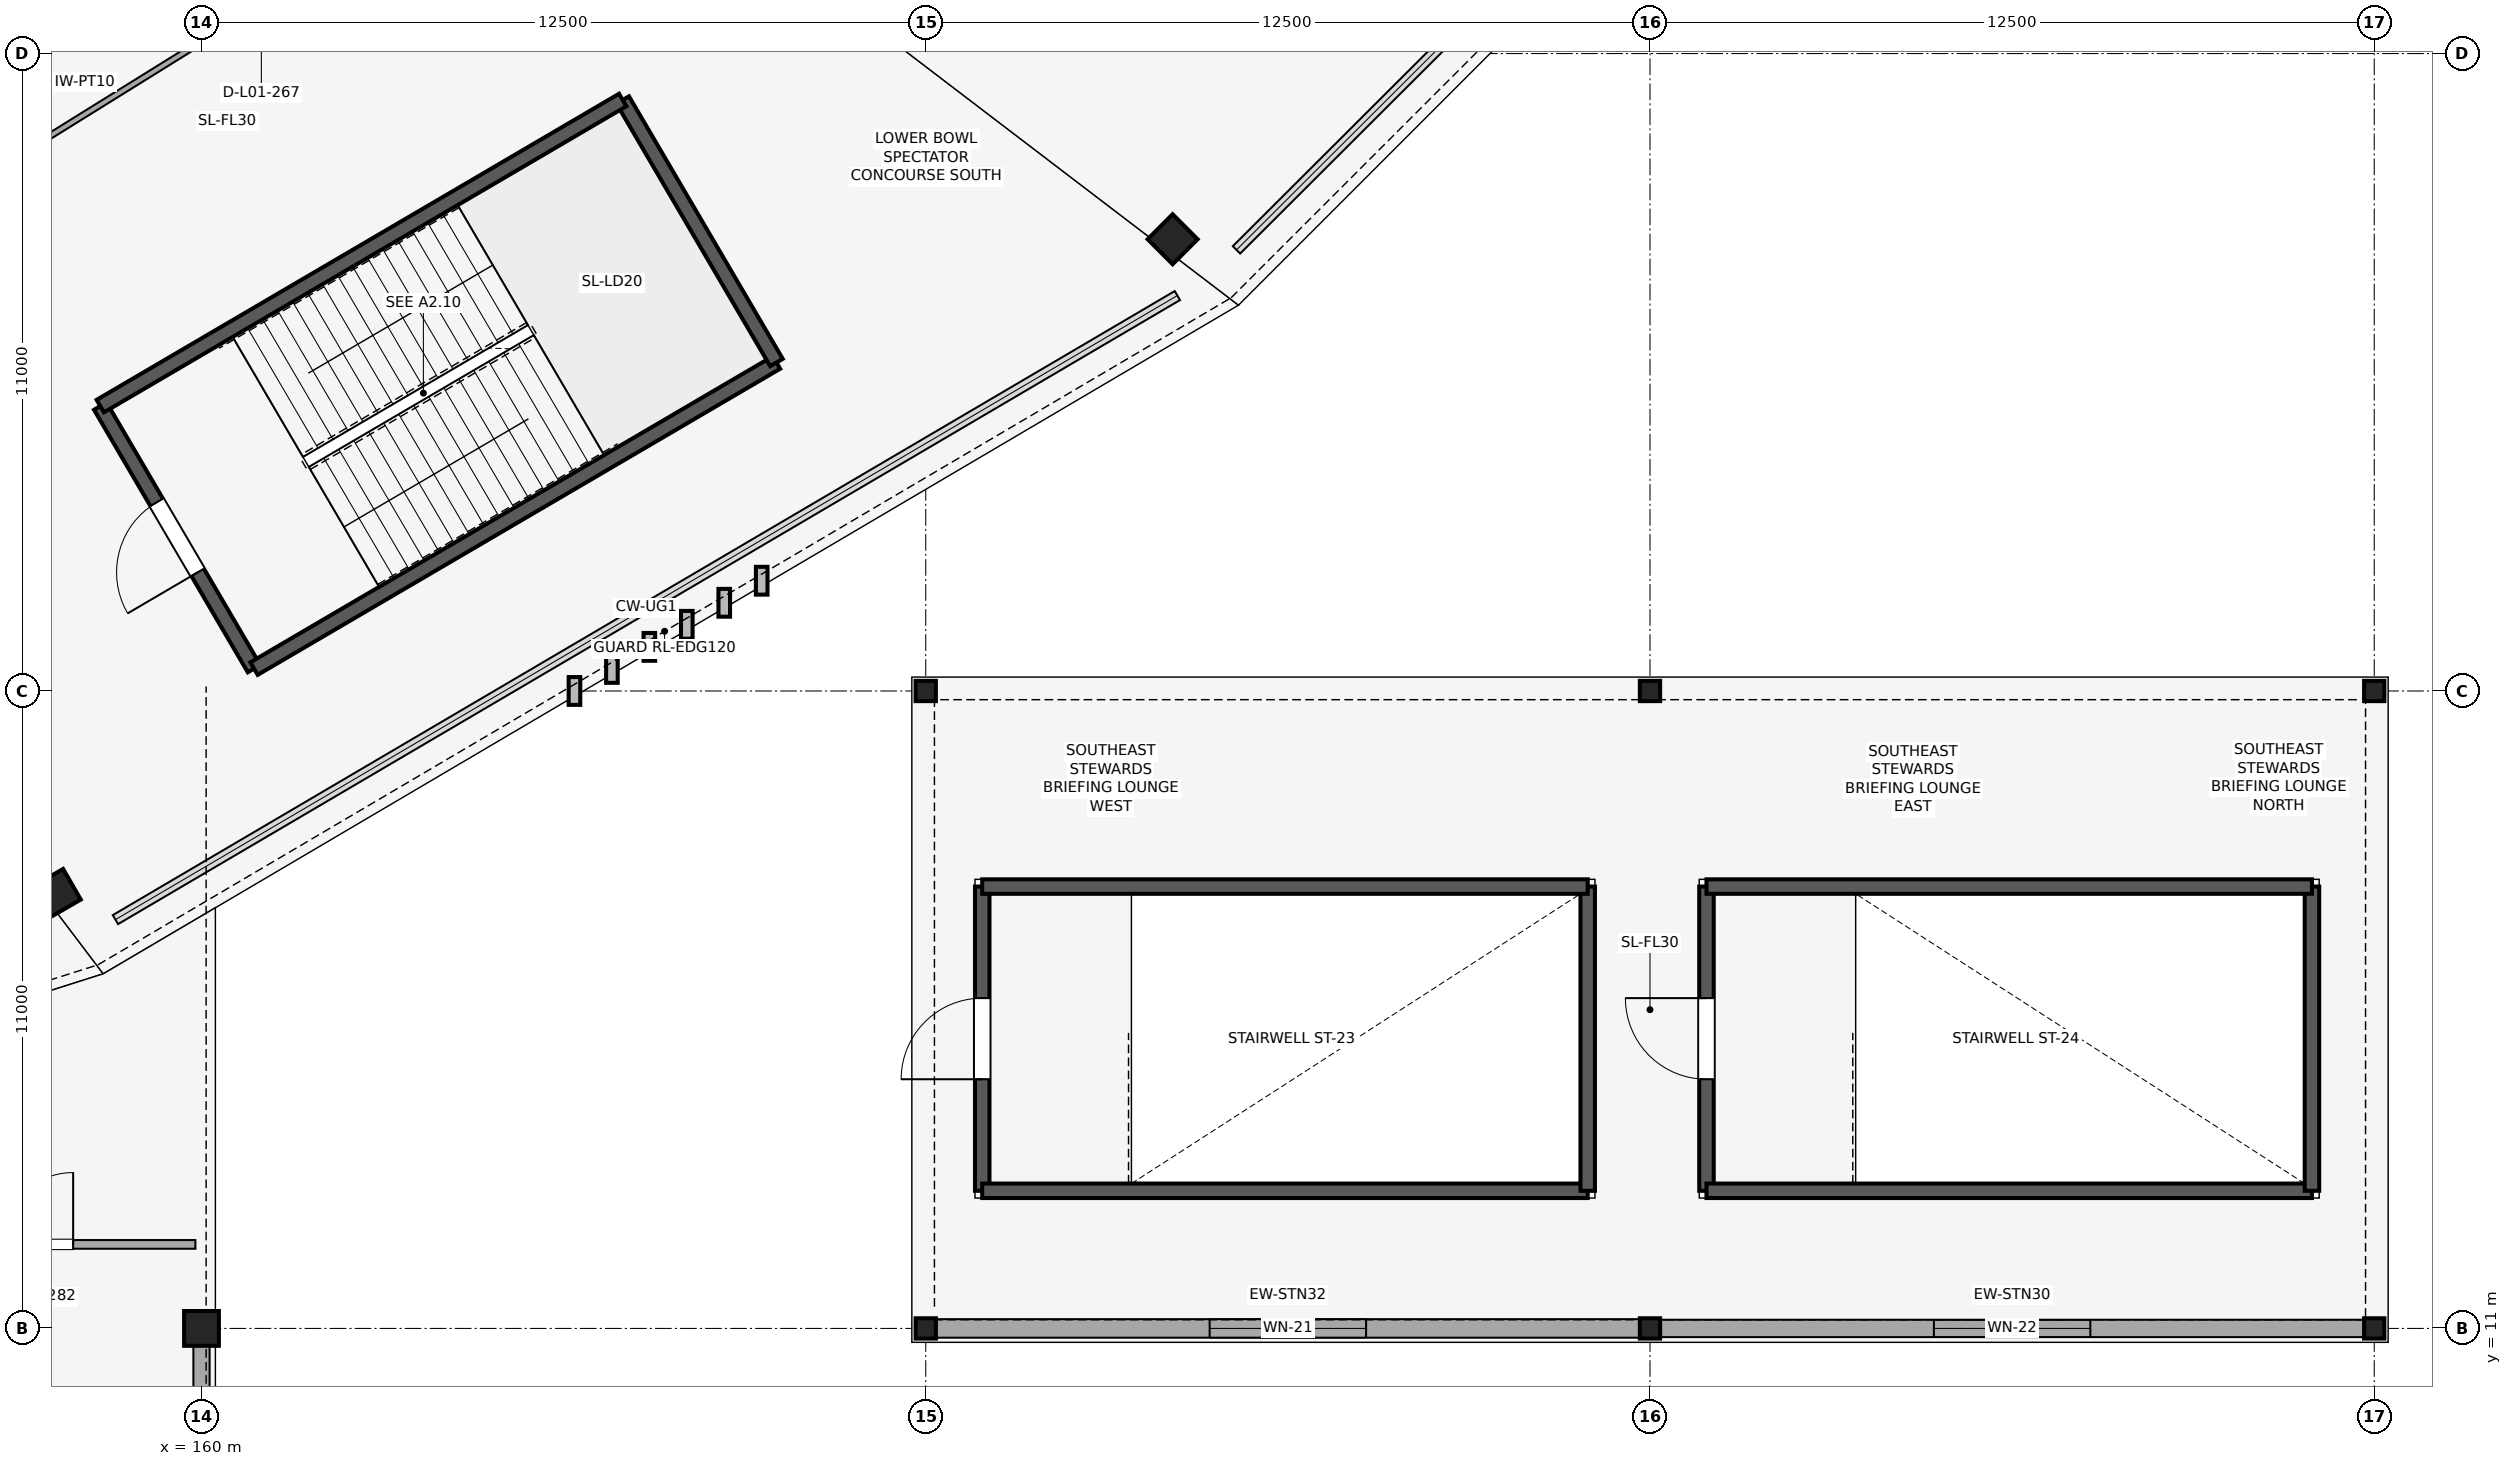
"""IFC4 building model, lengths in metres.
Left out: names, types, materials, properties, quantities, classifications, styles, units other than length and angle.
Written with IfcOpenShell. Run it as: python <this file> out.ifc"""

import sys

from ifc_helpers import new_model, si_unit, direction, frame, frame_2d, origin, origin_2d, place, context, subcontext, project, spatial, rectangle, hollow_rectangle, hollow_circle, extrude, element, fill, save


model = new_model("IFC4")
c1 = context("Model", 3, precision=1e-05, world=origin(), true_north=direction((0.0, 1.0)))
c2 = subcontext(c1, "Body", "Model", "MODEL_VIEW")
j1 = project(units=[si_unit("LENGTHUNIT", "METRE"), si_unit("PLANEANGLEUNIT", "RADIAN")], contexts=[c1])
p1 = place(None, origin())
s1 = spatial("IfcSite", under=j1, at=p1, CompositionType="ELEMENT")
p2 = place(p1, origin())
s2 = spatial("IfcBuilding", under=s1, at=p2, CompositionType="ELEMENT")
p3 = place(p2, frame((0.0, 0.0, 5.4)))
s3 = spatial("IfcBuildingStorey", under=s2, at=p3, CompositionType="ELEMENT", Elevation=5.4)
for number, where, z_axis, x_axis in (
    (1, (157.5, 18.512, 0.0), (0.0, 0.0, 1.0), (0.5, -0.866, 0.0)),
    (2, (176.761, 29.795, 0.0), (0.0, 0.0, 1.0), (0.707, -0.707, 0.0)),
):
    element("IfcColumn", number, at=place(p3, frame(where, z_axis=z_axis, x_axis=x_axis)), inside=s3, PredefinedType="COLUMN", context=c2, shape_type="SweptSolid", body=[
        extrude(hollow_circle(Radius=0.305, WallThickness=0.03, at=origin_2d()), origin(), (0.0, 0.0, 1.0), 5.2),
    ])
p4 = place(p3, frame((160.0, 11.0, 0.0), z_axis=(0.0, 0.0, 1.0), x_axis=(1.0, 0.0, 0.0)))
e3 = element("IfcColumn", 3, at=p4, inside=s3, PredefinedType="COLUMN", context=c2, shape_type="SweptSolid", body=[
    extrude(rectangle(XDim=0.6, YDim=0.6, at=origin_2d()), origin(), (0.0, 0.0, 1.0), 5.2),
])
for number, where, z_axis, x_axis in (
    (4, (172.5, 11.0, 0.0), (0.0, 0.0, 1.0), (1.0, 0.0, 0.0)),
    (5, (172.5, 22.0, 0.0), (0.0, 0.0, 1.0), (1.0, 0.0, 0.0)),
    (6, (185.0, 11.0, 0.0), (0.0, 0.0, 1.0), (1.0, 0.0, 0.0)),
    (7, (185.0, 22.0, 0.0), (0.0, 0.0, 1.0), (1.0, 0.0, 0.0)),
    (8, (197.5, 11.0, 0.0), (0.0, 0.0, 1.0), (1.0, 0.0, 0.0)),
    (9, (197.5, 22.0, 0.0), (0.0, 0.0, 1.0), (1.0, 0.0, 0.0)),
):
    element("IfcColumn", number, at=place(p3, frame(where, z_axis=z_axis, x_axis=x_axis)), inside=s3, PredefinedType="COLUMN", context=c2, shape_type="SweptSolid", body=[
        extrude(hollow_rectangle(XDim=0.35, YDim=0.35, WallThickness=0.02, at=origin_2d()), origin(), (0.0, 0.0, 1.0), 5.2),
    ])
p5 = place(p3, frame((160.0, 0.222, 0.0), z_axis=(0.0, 0.0, 1.0), x_axis=(0.0, 1.0, 0.0)))
e10 = element("IfcWall", 10, at=p5, inside=s3, PredefinedType="STANDARD", context=c2, shape_type="SweptSolid", body=[
    extrude(rectangle(XDim=10.481, YDim=0.28, at=frame_2d((5.24, 0.0))), origin(), (0.0, 0.0, 1.0), 4.3),
])
p6 = place(p5, frame((4.64, 0.0, 0.95)))
e11 = element("IfcOpeningElement", 11, at=p6, cuts=e10, PredefinedType="OPENING", context=c2, shape_type="SweptSolid", body=[
    extrude(rectangle(XDim=1.2, YDim=1.35, at=frame_2d((0.6, 0.675))), frame((0.0, 0.15, 0.0), z_axis=(0.0, -1.0, 0.0), x_axis=(1.0, 0.0, 0.0)), (0.0, 0.0, 1.0), 0.3),
])
p7 = place(p3, frame((172.672, 11.0, 0.0), z_axis=(0.0, 0.0, 1.0), x_axis=(1.0, 0.0, 0.0)))
e12 = element("IfcWall", 12, at=p7, inside=s3, PredefinedType="STANDARD", context=c2, shape_type="SweptSolid", body=[
    extrude(rectangle(XDim=12.156, YDim=0.32, at=frame_2d((6.078, 0.0))), origin(), (0.0, 0.0, 1.0), 4.3),
])
p8 = place(p7, frame((4.728, 0.0, 0.95)))
e13 = element("IfcOpeningElement", 13, at=p8, cuts=e12, PredefinedType="OPENING", context=c2, shape_type="SweptSolid", body=[
    extrude(rectangle(XDim=2.7, YDim=1.35, at=frame_2d((1.35, 0.675))), frame((0.0, 0.17, 0.0), z_axis=(0.0, -1.0, 0.0), x_axis=(1.0, 0.0, 0.0)), (0.0, 0.0, 1.0), 0.34),
])
p9 = place(p3, frame((185.172, 11.0, 0.0), z_axis=(0.0, 0.0, 1.0), x_axis=(1.0, 0.0, 0.0)))
e14 = element("IfcWall", 14, at=p9, inside=s3, PredefinedType="STANDARD", context=c2, shape_type="SweptSolid", body=[
    extrude(rectangle(XDim=12.156, YDim=0.3, at=frame_2d((6.078, 0.0))), origin(), (0.0, 0.0, 1.0), 4.3),
])
p10 = place(p9, frame((4.728, 0.0, 0.95)))
e15 = element("IfcOpeningElement", 15, at=p10, cuts=e14, PredefinedType="OPENING", context=c2, shape_type="SweptSolid", body=[
    extrude(rectangle(XDim=2.7, YDim=1.6, at=frame_2d((1.35, 0.8))), frame((0.0, 0.16, 0.0), z_axis=(0.0, -1.0, 0.0), x_axis=(1.0, 0.0, 0.0)), (0.0, 0.0, 1.0), 0.32),
])
p11 = place(p3, frame((158.253, 26.916, 0.0), z_axis=(0.0, 0.0, 1.0), x_axis=(0.505460490551, -0.862849750821, 0.0)))
e16 = element("IfcWall", 16, at=p11, inside=s3, PredefinedType="SHEAR", context=c2, shape_type="SweptSolid", body=[
    extrude(rectangle(XDim=5.25, YDim=0.25, at=frame_2d((2.625, 0.0))), origin(), (0.0, 0.0, 1.0), 4.92),
])
p12 = place(p11, frame((1.925, 0.0, 0.0)))
e17 = element("IfcOpeningElement", 17, at=p12, cuts=e16, PredefinedType="OPENING", context=c2, shape_type="SweptSolid", body=[
    extrude(rectangle(XDim=1.4, YDim=2.2, at=frame_2d((0.7, 1.1))), frame((0.0, 0.135, 0.0), z_axis=(0.0, -1.0, 0.0), x_axis=(1.0, 0.0, 0.0)), (0.0, 0.0, 1.0), 0.27),
])
p13 = place(p3, frame((160.907, 22.386, 0.0), z_axis=(0.0, 0.0, 1.0), x_axis=(0.862854686184, 0.505452065513, 0.0)))
e18 = element("IfcWall", 18, at=p13, inside=s3, PredefinedType="SHEAR", context=c2, shape_type="SweptSolid", body=[
    extrude(rectangle(XDim=10.45, YDim=0.25, at=frame_2d((5.225, 0.0))), origin(), (0.0, 0.0, 1.0), 4.92),
])
p14 = place(p3, frame((169.924, 27.668, 0.0), z_axis=(0.0, 0.0, 1.0), x_axis=(-0.505474830399, 0.862841350327, 0.0)))
e19 = element("IfcWall", 19, at=p14, inside=s3, PredefinedType="SHEAR", context=c2, shape_type="SweptSolid", body=[
    extrude(rectangle(XDim=5.25, YDim=0.25, at=frame_2d((2.625, 0.0))), origin(), (0.0, 0.0, 1.0), 4.92),
])
p15 = place(p3, frame((167.27, 32.198, 0.0), z_axis=(0.0, 0.0, 1.0), x_axis=(-0.862838527648, -0.505479648657, 0.0)))
e20 = element("IfcWall", 20, at=p15, inside=s3, PredefinedType="SHEAR", context=c2, shape_type="SweptSolid", body=[
    extrude(rectangle(XDim=10.45, YDim=0.25, at=frame_2d((5.225, 0.0))), origin(), (0.0, 0.0, 1.0), 4.92),
])
p16 = place(p3, frame((173.475, 18.625, 0.0), z_axis=(0.0, 0.0, 1.0), x_axis=(0.0, -1.0, 0.0)))
e21 = element("IfcWall", 21, at=p16, inside=s3, PredefinedType="SHEAR", context=c2, shape_type="SweptSolid", body=[
    extrude(rectangle(XDim=5.25, YDim=0.25, at=frame_2d((2.625, 0.0))), origin(), (0.0, 0.0, 1.0), 3.2),
])
p17 = place(p16, frame((1.925, 0.0, 0.0)))
e22 = element("IfcOpeningElement", 22, at=p17, cuts=e21, PredefinedType="OPENING", context=c2, shape_type="SweptSolid", body=[
    extrude(rectangle(XDim=1.4, YDim=2.2, at=frame_2d((0.7, 1.1))), frame((0.0, 0.135, 0.0), z_axis=(0.0, -1.0, 0.0), x_axis=(1.0, 0.0, 0.0)), (0.0, 0.0, 1.0), 0.27),
])
p18 = place(p3, frame((173.475, 13.375, 0.0), z_axis=(0.0, 0.0, 1.0), x_axis=(1.0, 0.0, 0.0)))
e23 = element("IfcWall", 23, at=p18, inside=s3, PredefinedType="SHEAR", context=c2, shape_type="SweptSolid", body=[
    extrude(rectangle(XDim=10.45, YDim=0.25, at=frame_2d((5.225, 0.0))), origin(), (0.0, 0.0, 1.0), 3.2),
])
p19 = place(p3, frame((183.925, 13.375, 0.0), z_axis=(0.0, 0.0, 1.0), x_axis=(0.0, 1.0, 0.0)))
e24 = element("IfcWall", 24, at=p19, inside=s3, PredefinedType="SHEAR", context=c2, shape_type="SweptSolid", body=[
    extrude(rectangle(XDim=5.25, YDim=0.25, at=frame_2d((2.625, 0.0))), origin(), (0.0, 0.0, 1.0), 3.2),
])
p20 = place(p3, frame((183.925, 18.625, 0.0), z_axis=(0.0, 0.0, 1.0), x_axis=(-1.0, 0.0, 0.0)))
e25 = element("IfcWall", 25, at=p20, inside=s3, PredefinedType="SHEAR", context=c2, shape_type="SweptSolid", body=[
    extrude(rectangle(XDim=10.45, YDim=0.25, at=frame_2d((5.225, 0.0))), origin(), (0.0, 0.0, 1.0), 3.2),
])
p21 = place(p3, frame((185.975, 18.625, 0.0), z_axis=(0.0, 0.0, 1.0), x_axis=(0.0, -1.0, 0.0)))
e26 = element("IfcWall", 26, at=p21, inside=s3, PredefinedType="SHEAR", context=c2, shape_type="SweptSolid", body=[
    extrude(rectangle(XDim=5.25, YDim=0.25, at=frame_2d((2.625, 0.0))), origin(), (0.0, 0.0, 1.0), 3.2),
])
p22 = place(p21, frame((1.925, 0.0, 0.0)))
e27 = element("IfcOpeningElement", 27, at=p22, cuts=e26, PredefinedType="OPENING", context=c2, shape_type="SweptSolid", body=[
    extrude(rectangle(XDim=1.4, YDim=2.2, at=frame_2d((0.7, 1.1))), frame((0.0, 0.135, 0.0), z_axis=(0.0, -1.0, 0.0), x_axis=(1.0, 0.0, 0.0)), (0.0, 0.0, 1.0), 0.27),
])
p23 = place(p3, frame((185.975, 13.375, 0.0), z_axis=(0.0, 0.0, 1.0), x_axis=(1.0, 0.0, 0.0)))
e28 = element("IfcWall", 28, at=p23, inside=s3, PredefinedType="SHEAR", context=c2, shape_type="SweptSolid", body=[
    extrude(rectangle(XDim=10.45, YDim=0.25, at=frame_2d((5.225, 0.0))), origin(), (0.0, 0.0, 1.0), 3.2),
])
p24 = place(p3, frame((196.425, 13.375, 0.0), z_axis=(0.0, 0.0, 1.0), x_axis=(0.0, 1.0, 0.0)))
e29 = element("IfcWall", 29, at=p24, inside=s3, PredefinedType="SHEAR", context=c2, shape_type="SweptSolid", body=[
    extrude(rectangle(XDim=5.25, YDim=0.25, at=frame_2d((2.625, 0.0))), origin(), (0.0, 0.0, 1.0), 3.2),
])
p25 = place(p3, frame((196.425, 18.625, 0.0), z_axis=(0.0, 0.0, 1.0), x_axis=(-1.0, 0.0, 0.0)))
e30 = element("IfcWall", 30, at=p25, inside=s3, PredefinedType="SHEAR", context=c2, shape_type="SweptSolid", body=[
    extrude(rectangle(XDim=10.45, YDim=0.25, at=frame_2d((5.225, 0.0))), origin(), (0.0, 0.0, 1.0), 3.2),
])
p26 = place(p3, frame((152.442, 28.505, 0.0), z_axis=(0.0, 0.0, 1.0), x_axis=(0.849309161724, 0.527895773625, 0.0)))
e31 = element("IfcWall", 31, at=p26, inside=s3, PredefinedType="PARTITIONING", context=c2, shape_type="SweptSolid", body=[
    extrude(rectangle(XDim=19.486, YDim=0.1, at=frame_2d((9.743, 0.0))), origin(), (0.0, 0.0, 1.0), 3.67),
])
p27 = place(p26, frame((9.233, 0.0, 0.0)))
e32 = element("IfcOpeningElement", 32, at=p27, cuts=e31, PredefinedType="OPENING", context=c2, shape_type="SweptSolid", body=[
    extrude(rectangle(XDim=1.02, YDim=2.1, at=frame_2d((0.51, 1.05))), frame((0.0, 0.06, 0.0), z_axis=(0.0, -1.0, 0.0), x_axis=(1.0, 0.0, 0.0)), (0.0, 0.0, 1.0), 0.12),
])
p28 = place(p3, frame((147.585, 12.45, 0.0), z_axis=(0.0, 0.0, 1.0), x_axis=(1.0, 0.0, 0.0)))
e33 = element("IfcWall", 33, at=p28, inside=s3, PredefinedType="PARTITIONING", context=c2, shape_type="SweptSolid", body=[
    extrude(rectangle(XDim=12.31, YDim=0.15, at=frame_2d((6.155, 0.0))), origin(), (0.0, 0.0, 1.0), 3.67),
])
p29 = place(p28, frame((8.96, 0.0, 0.0)))
e34 = element("IfcOpeningElement", 34, at=p29, cuts=e33, PredefinedType="OPENING", context=c2, shape_type="SweptSolid", body=[
    extrude(rectangle(XDim=1.24, YDim=2.1, at=frame_2d((0.62, 1.05))), frame((0.0, 0.085, 0.0), z_axis=(0.0, -1.0, 0.0), x_axis=(1.0, 0.0, 0.0)), (0.0, 0.0, 1.0), 0.17),
])
p30 = place(p8, origin())
e35 = element("IfcWindow", 35, at=p30, inside=s3, PartitioningType="SINGLE_PANEL", PredefinedType="WINDOW", context=c2, shape_type="SweptSolid", body=[
    extrude(rectangle(XDim=2.7, YDim=1.35, at=frame_2d((1.35, 0.675))), frame((0.0, 0.03, 0.0), z_axis=(0.0, -1.0, 0.0), x_axis=(1.0, 0.0, 0.0)), (0.0, 0.0, 1.0), 0.06),
])
fill(e13, e35)
p31 = place(p10, origin())
e36 = element("IfcWindow", 36, at=p31, inside=s3, PartitioningType="SINGLE_PANEL", PredefinedType="WINDOW", context=c2, shape_type="SweptSolid", body=[
    extrude(rectangle(XDim=2.7, YDim=1.6, at=frame_2d((1.35, 0.8))), frame((0.0, 0.03, 0.0), z_axis=(0.0, -1.0, 0.0), x_axis=(1.0, 0.0, 0.0)), (0.0, 0.0, 1.0), 0.06),
])
fill(e15, e36)
p32 = place(p12, frame((1.4, 0.0, 0.0), z_axis=(0.0, 0.0, 1.0), x_axis=(-1.0, 0.0, 0.0)))
e37 = element("IfcDoor", 37, at=p32, inside=s3, OperationType="SINGLE_SWING_LEFT", PredefinedType="DOOR", context=c2, shape_type="SweptSolid", body=[
    extrude(rectangle(XDim=1.4, YDim=2.2, at=frame_2d((0.7, 1.1))), frame((0.0, 0.025, 0.0), z_axis=(0.0, -1.0, 0.0), x_axis=(1.0, 0.0, 0.0)), (0.0, 0.0, 1.0), 0.05),
])
fill(e17, e37)
p33 = place(p17, frame((1.4, 0.0, 0.0), z_axis=(0.0, 0.0, 1.0), x_axis=(-1.0, 0.0, 0.0)))
e38 = element("IfcDoor", 38, at=p33, inside=s3, OperationType="SINGLE_SWING_LEFT", PredefinedType="DOOR", context=c2, shape_type="SweptSolid", body=[
    extrude(rectangle(XDim=1.4, YDim=2.2, at=frame_2d((0.7, 1.1))), frame((0.0, 0.025, 0.0), z_axis=(0.0, -1.0, 0.0), x_axis=(1.0, 0.0, 0.0)), (0.0, 0.0, 1.0), 0.05),
])
fill(e22, e38)
p34 = place(p22, frame((1.4, 0.0, 0.0), z_axis=(0.0, 0.0, 1.0), x_axis=(-1.0, 0.0, 0.0)))
e39 = element("IfcDoor", 39, at=p34, inside=s3, OperationType="SINGLE_SWING_RIGHT", PredefinedType="DOOR", context=c2, shape_type="SweptSolid", body=[
    extrude(rectangle(XDim=1.4, YDim=2.2, at=frame_2d((0.7, 1.1))), frame((0.0, 0.025, 0.0), z_axis=(0.0, -1.0, 0.0), x_axis=(1.0, 0.0, 0.0)), (0.0, 0.0, 1.0), 0.05),
])
fill(e27, e39)
p35 = place(p29, origin())
e40 = element("IfcDoor", 40, at=p35, inside=s3, OperationType="SINGLE_SWING_RIGHT", PredefinedType="DOOR", context=c2, shape_type="SweptSolid", body=[
    extrude(rectangle(XDim=1.24, YDim=2.1, at=frame_2d((0.62, 1.05))), frame((0.0, 0.025, 0.0), z_axis=(0.0, -1.0, 0.0), x_axis=(1.0, 0.0, 0.0)), (0.0, 0.0, 1.0), 0.05),
])
fill(e34, e40)
save(model, sys.argv[1])
